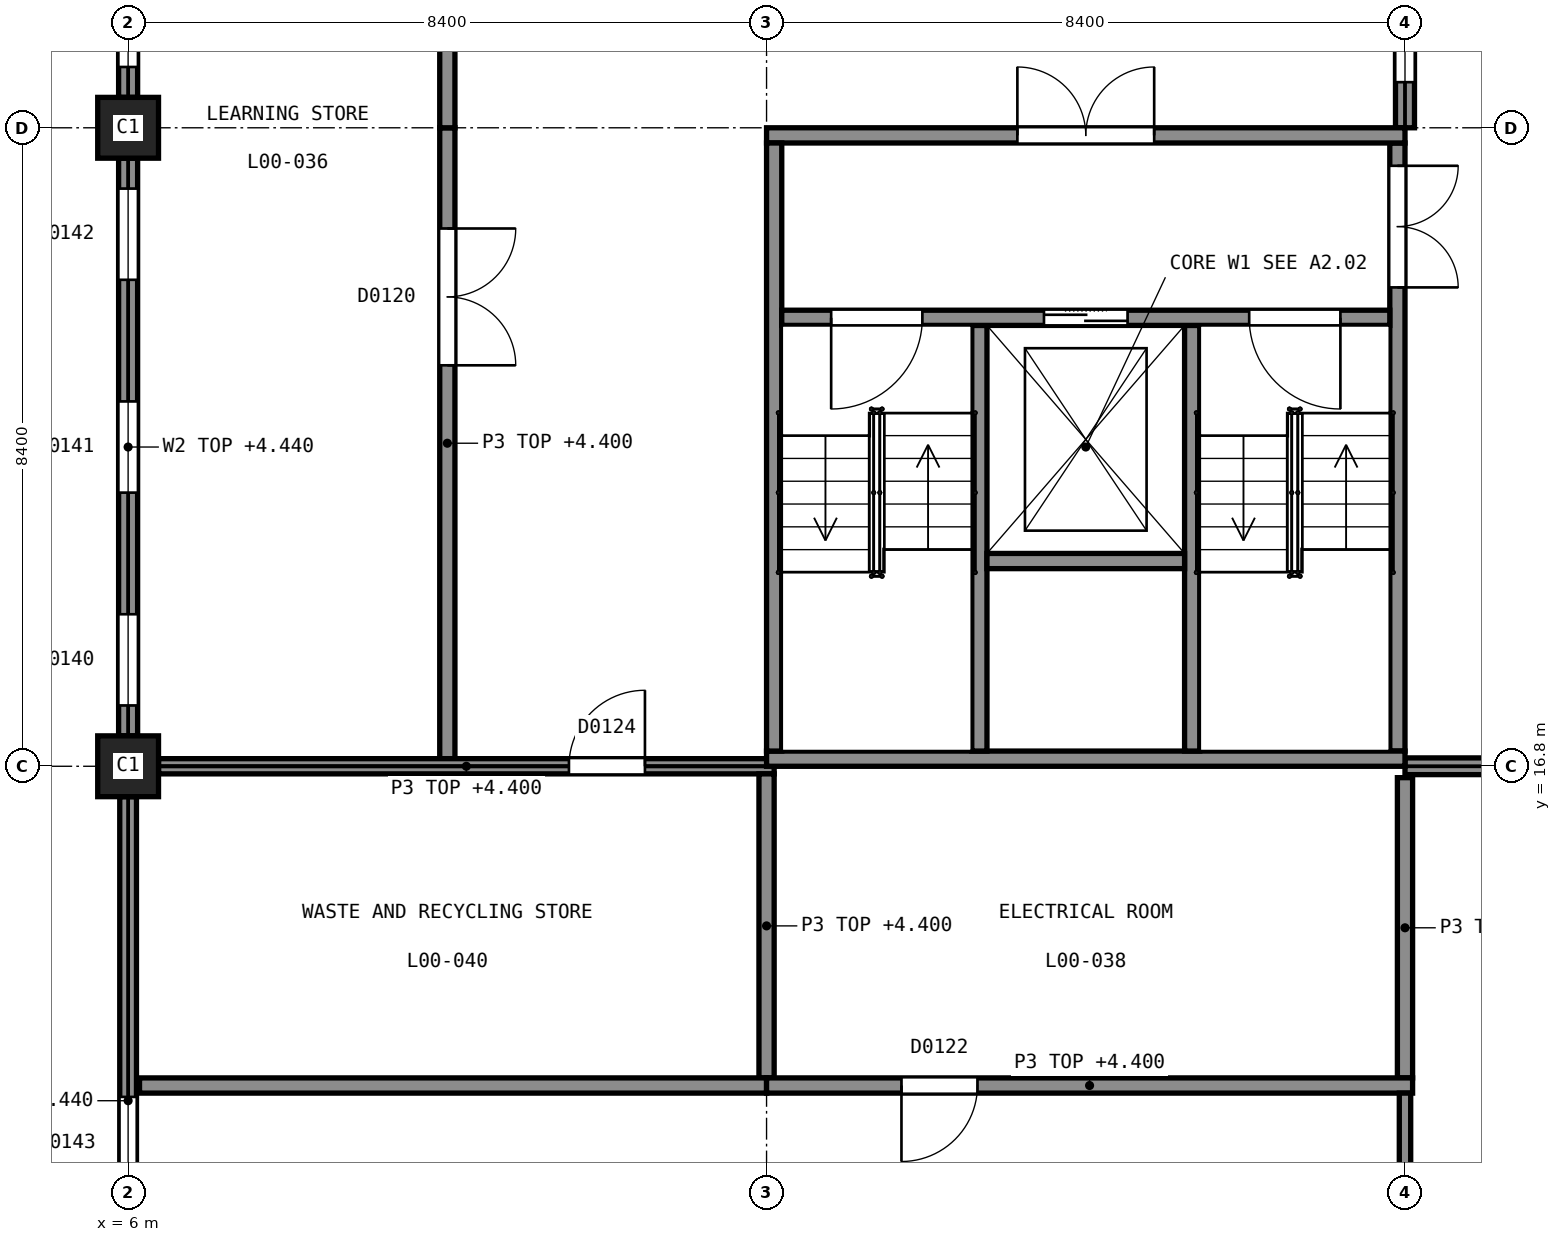
"""IFC4 building model, lengths in metres.
Left out: names, types, materials, properties, quantities, classifications, styles, units other than length and angle.
Written with IfcOpenShell. Run it as: python <this file> out.ifc"""

import sys

from ifc_helpers import new_model, si_unit, direction, frame, frame_2d, origin, origin_2d, place, context, subcontext, project, spatial, rectangle, extrude, element, fill, save


model = new_model("IFC4")
c1 = context("Model", 3, precision=1e-05, world=origin(), true_north=direction((0.0, 1.0)))
c2 = subcontext(c1, "Body", "Model", "MODEL_VIEW")
j1 = project(units=[si_unit("LENGTHUNIT", "METRE"), si_unit("PLANEANGLEUNIT", "RADIAN")], contexts=[c1])
p1 = place(None, origin())
s1 = spatial("IfcSite", under=j1, at=p1, CompositionType="ELEMENT")
p2 = place(p1, origin())
s2 = spatial("IfcBuilding", under=s1, at=p2, CompositionType="ELEMENT")
p3 = place(p2, origin())
s3 = spatial("IfcBuildingStorey", under=s2, at=p3, CompositionType="ELEMENT", Elevation=0.0)
p4 = place(p3, frame((14.4, 16.9, -1.8), z_axis=(0.0, 0.0, 1.0), x_axis=(1.0, 0.0, 0.0)))
e1 = element("IfcWall", 1, at=p4, inside=s3, PredefinedType="SHEAR", context=c2, shape_type="SweptSolid", body=[
    extrude(rectangle(XDim=8.4, YDim=0.2, at=frame_2d((4.2, 0.0))), origin(), (0.0, 0.0, 1.0), 7.3),
])
p5 = place(p3, frame((14.4, 25.1, -1.8), z_axis=(0.0, 0.0, 1.0), x_axis=(1.0, 0.0, 0.0)))
e2 = element("IfcWall", 2, at=p5, inside=s3, PredefinedType="SHEAR", context=c2, shape_type="SweptSolid", body=[
    extrude(rectangle(XDim=8.4, YDim=0.2, at=frame_2d((4.2, 0.0))), origin(), (0.0, 0.0, 1.0), 7.3),
])
p6 = place(p5, frame((3.3, 0.0, 1.8)))
e3 = element("IfcOpeningElement", 3, at=p6, cuts=e2, PredefinedType="OPENING", context=c2, shape_type="SweptSolid", body=[
    extrude(rectangle(XDim=1.8, YDim=2.1, at=frame_2d((0.9, 1.05))), frame((0.0, 0.11, 0.0), z_axis=(0.0, -1.0, 0.0), x_axis=(1.0, 0.0, 0.0)), (0.0, 0.0, 1.0), 0.22),
])
p7 = place(p3, frame((14.5, 17.0, -1.8), z_axis=(0.0, 0.0, 1.0), x_axis=(0.0, 1.0, 0.0)))
e4 = element("IfcWall", 4, at=p7, inside=s3, PredefinedType="SHEAR", context=c2, shape_type="SweptSolid", body=[
    extrude(rectangle(XDim=8.0, YDim=0.2, at=frame_2d((4.0, 0.0))), origin(), (0.0, 0.0, 1.0), 7.3),
])
p8 = place(p3, frame((22.7, 25.0, -1.8), z_axis=(0.0, 0.0, 1.0), x_axis=(0.0, -1.0, 0.0)))
e5 = element("IfcWall", 5, at=p8, inside=s3, PredefinedType="SHEAR", context=c2, shape_type="SweptSolid", body=[
    extrude(rectangle(XDim=8.0, YDim=0.2, at=frame_2d((4.0, 0.0))), origin(), (0.0, 0.0, 1.0), 7.3),
])
p9 = place(p8, frame((0.3, 0.0, 1.8)))
e6 = element("IfcOpeningElement", 6, at=p9, cuts=e5, PredefinedType="OPENING", context=c2, shape_type="SweptSolid", body=[
    extrude(rectangle(XDim=1.6, YDim=2.1, at=frame_2d((0.8, 1.05))), frame((0.0, 0.11, 0.0), z_axis=(0.0, -1.0, 0.0), x_axis=(1.0, 0.0, 0.0)), (0.0, 0.0, 1.0), 0.22),
])
p10 = place(p3, frame((14.6, 22.7, -1.8), z_axis=(0.0, 0.0, 1.0), x_axis=(1.0, 0.0, 0.0)))
e7 = element("IfcWall", 7, at=p10, inside=s3, PredefinedType="SHEAR", context=c2, shape_type="SweptSolid", body=[
    extrude(rectangle(XDim=8.0, YDim=0.2, at=frame_2d((4.0, 0.0))), origin(), (0.0, 0.0, 1.0), 7.3),
])
p11 = place(p10, frame((0.65, 0.0, 1.8)))
e8 = element("IfcOpeningElement", 8, at=p11, cuts=e7, PredefinedType="OPENING", context=c2, shape_type="SweptSolid", body=[
    extrude(rectangle(XDim=1.2, YDim=2.1, at=frame_2d((0.6, 1.05))), frame((0.0, 0.11, 0.0), z_axis=(0.0, -1.0, 0.0), x_axis=(1.0, 0.0, 0.0)), (0.0, 0.0, 1.0), 0.22),
])
p12 = place(p10, frame((6.15, 0.0, 1.8)))
e9 = element("IfcOpeningElement", 9, at=p12, cuts=e7, PredefinedType="OPENING", context=c2, shape_type="SweptSolid", body=[
    extrude(rectangle(XDim=1.2, YDim=2.1, at=frame_2d((0.6, 1.05))), frame((0.0, 0.11, 0.0), z_axis=(0.0, -1.0, 0.0), x_axis=(1.0, 0.0, 0.0)), (0.0, 0.0, 1.0), 0.22),
])
p13 = place(p10, frame((3.45, 0.0, 1.8)))
e10 = element("IfcOpeningElement", 10, at=p13, cuts=e7, PredefinedType="OPENING", context=c2, shape_type="SweptSolid", body=[
    extrude(rectangle(XDim=1.1, YDim=2.1, at=frame_2d((0.55, 1.05))), frame((0.0, 0.11, 0.0), z_axis=(0.0, -1.0, 0.0), x_axis=(1.0, 0.0, 0.0)), (0.0, 0.0, 1.0), 0.22),
])
for number, where, z_axis, x_axis in (
    (11, (17.2, 17.0, -1.8), (0.0, 0.0, 1.0), (0.0, 1.0, 0.0)),
    (12, (20.0, 17.0, -1.8), (0.0, 0.0, 1.0), (0.0, 1.0, 0.0)),
):
    element("IfcWall", number, at=place(p3, frame(where, z_axis=z_axis, x_axis=x_axis)), inside=s3, PredefinedType="SHEAR", context=c2, shape_type="SweptSolid", body=[
        extrude(rectangle(XDim=5.6, YDim=0.2, at=frame_2d((2.8, 0.0))), origin(), (0.0, 0.0, 1.0), 7.3),
    ])
p14 = place(p3, frame((17.3, 19.5, -1.8), z_axis=(0.0, 0.0, 1.0), x_axis=(1.0, 0.0, 0.0)))
e13 = element("IfcWall", 13, at=p14, inside=s3, PredefinedType="SHEAR", context=c2, shape_type="SweptSolid", body=[
    extrude(rectangle(XDim=2.6, YDim=0.2, at=frame_2d((1.3, 0.0))), origin(), (0.0, 0.0, 1.0), 7.3),
])
for number, where, z_axis, x_axis in (
    (14, (6.0, 16.8, -0.3), (0.0, 0.0, 1.0), (1.0, 0.0, 0.0)),
    (15, (6.0, 25.2, -0.3), (0.0, 0.0, 1.0), (1.0, 0.0, 0.0)),
):
    element("IfcColumn", number, at=place(p3, frame(where, z_axis=z_axis, x_axis=x_axis)), inside=s3, PredefinedType="COLUMN", context=c2, shape_type="SweptSolid", body=[
        extrude(rectangle(XDim=0.8, YDim=0.8, at=origin_2d()), origin(), (0.0, 0.0, 1.0), 5.8),
    ])
p15 = place(p3, frame((22.8, 16.8, 0.0), z_axis=(0.0, 0.0, 1.0), x_axis=(1.0, 0.0, 0.0)))
e16 = element("IfcWall", 16, at=p15, inside=s3, PredefinedType="SOLIDWALL", context=c2, shape_type="SweptSolid", body=[
    extrude(rectangle(XDim=8.0, YDim=0.22, at=frame_2d((4.0, 0.0))), origin(), (0.0, 0.0, 1.0), 4.44),
])
p16 = place(p15, frame((3.4, 0.0, 2.1)))
e17 = element("IfcOpeningElement", 17, at=p16, cuts=e16, PredefinedType="OPENING", context=c2, shape_type="SweptSolid", body=[
    extrude(rectangle(XDim=1.2, YDim=0.6, at=frame_2d((0.6, 0.3))), frame((0.0, 0.12, 0.0), z_axis=(0.0, -1.0, 0.0), x_axis=(1.0, 0.0, 0.0)), (0.0, 0.0, 1.0), 0.24),
])
p17 = place(p3, frame((22.8, 25.2, 0.0), z_axis=(0.0, 0.0, 1.0), x_axis=(0.0, 1.0, 0.0)))
e18 = element("IfcWall", 18, at=p17, inside=s3, PredefinedType="SOLIDWALL", context=c2, shape_type="SweptSolid", body=[
    extrude(rectangle(XDim=8.0, YDim=0.25, at=frame_2d((4.0, 0.0))), origin(), (0.0, 0.0, 1.0), 4.44),
])
p18 = place(p17, frame((0.6, 0.0, 0.9)))
e19 = element("IfcOpeningElement", 19, at=p18, cuts=e18, PredefinedType="OPENING", context=c2, shape_type="SweptSolid", body=[
    extrude(rectangle(XDim=1.2, YDim=2.1, at=frame_2d((0.6, 1.05))), frame((0.0, 0.135, 0.0), z_axis=(0.0, -1.0, 0.0), x_axis=(1.0, 0.0, 0.0)), (0.0, 0.0, 1.0), 0.27),
])
p19 = place(p17, frame((2.85, 0.0, 0.9)))
e20 = element("IfcOpeningElement", 20, at=p19, cuts=e18, PredefinedType="OPENING", context=c2, shape_type="SweptSolid", body=[
    extrude(rectangle(XDim=1.2, YDim=2.1, at=frame_2d((0.6, 1.05))), frame((0.0, 0.135, 0.0), z_axis=(0.0, -1.0, 0.0), x_axis=(1.0, 0.0, 0.0)), (0.0, 0.0, 1.0), 0.27),
])
p20 = place(p17, frame((6.2, 0.0, 0.9)))
e21 = element("IfcOpeningElement", 21, at=p20, cuts=e18, PredefinedType="OPENING", context=c2, shape_type="SweptSolid", body=[
    extrude(rectangle(XDim=1.2, YDim=2.1, at=frame_2d((0.6, 1.05))), frame((0.0, 0.135, 0.0), z_axis=(0.0, -1.0, 0.0), x_axis=(1.0, 0.0, 0.0)), (0.0, 0.0, 1.0), 0.27),
])
p21 = place(p3, frame((6.0, 25.6, 0.0), z_axis=(0.0, 0.0, 1.0), x_axis=(0.0, 1.0, 0.0)))
e22 = element("IfcWall", 22, at=p21, inside=s3, PredefinedType="SOLIDWALL", context=c2, shape_type="SweptSolid", body=[
    extrude(rectangle(XDim=7.6, YDim=0.25, at=frame_2d((3.8, 0.0))), origin(), (0.0, 0.0, 1.0), 4.44),
])
p22 = place(p21, frame((0.4, 0.0, 0.9)))
e23 = element("IfcOpeningElement", 23, at=p22, cuts=e22, PredefinedType="OPENING", context=c2, shape_type="SweptSolid", body=[
    extrude(rectangle(XDim=1.2, YDim=2.1, at=frame_2d((0.6, 1.05))), frame((0.0, 0.135, 0.0), z_axis=(0.0, -1.0, 0.0), x_axis=(1.0, 0.0, 0.0)), (0.0, 0.0, 1.0), 0.27),
])
p23 = place(p21, frame((3.2, 0.0, 0.9)))
e24 = element("IfcOpeningElement", 24, at=p23, cuts=e22, PredefinedType="OPENING", context=c2, shape_type="SweptSolid", body=[
    extrude(rectangle(XDim=1.2, YDim=2.1, at=frame_2d((0.6, 1.05))), frame((0.0, 0.135, 0.0), z_axis=(0.0, -1.0, 0.0), x_axis=(1.0, 0.0, 0.0)), (0.0, 0.0, 1.0), 0.27),
])
p24 = place(p21, frame((6.0, 0.0, 0.9)))
e25 = element("IfcOpeningElement", 25, at=p24, cuts=e22, PredefinedType="OPENING", context=c2, shape_type="SweptSolid", body=[
    extrude(rectangle(XDim=1.2, YDim=2.1, at=frame_2d((0.6, 1.05))), frame((0.0, 0.135, 0.0), z_axis=(0.0, -1.0, 0.0), x_axis=(1.0, 0.0, 0.0)), (0.0, 0.0, 1.0), 0.27),
])
p25 = place(p3, frame((6.0, 17.2, 0.0), z_axis=(0.0, 0.0, 1.0), x_axis=(0.0, 1.0, 0.0)))
e26 = element("IfcWall", 26, at=p25, inside=s3, PredefinedType="SOLIDWALL", context=c2, shape_type="SweptSolid", body=[
    extrude(rectangle(XDim=7.6, YDim=0.25, at=frame_2d((3.8, 0.0))), origin(), (0.0, 0.0, 1.0), 4.44),
])
p26 = place(p25, frame((0.4, 0.0, 0.9)))
e27 = element("IfcOpeningElement", 27, at=p26, cuts=e26, PredefinedType="OPENING", context=c2, shape_type="SweptSolid", body=[
    extrude(rectangle(XDim=1.2, YDim=2.1, at=frame_2d((0.6, 1.05))), frame((0.0, 0.135, 0.0), z_axis=(0.0, -1.0, 0.0), x_axis=(1.0, 0.0, 0.0)), (0.0, 0.0, 1.0), 0.27),
])
p27 = place(p25, frame((3.2, 0.0, 0.9)))
e28 = element("IfcOpeningElement", 28, at=p27, cuts=e26, PredefinedType="OPENING", context=c2, shape_type="SweptSolid", body=[
    extrude(rectangle(XDim=1.2, YDim=2.1, at=frame_2d((0.6, 1.05))), frame((0.0, 0.135, 0.0), z_axis=(0.0, -1.0, 0.0), x_axis=(1.0, 0.0, 0.0)), (0.0, 0.0, 1.0), 0.27),
])
p28 = place(p25, frame((6.0, 0.0, 0.9)))
e29 = element("IfcOpeningElement", 29, at=p28, cuts=e26, PredefinedType="OPENING", context=c2, shape_type="SweptSolid", body=[
    extrude(rectangle(XDim=1.2, YDim=2.1, at=frame_2d((0.6, 1.05))), frame((0.0, 0.135, 0.0), z_axis=(0.0, -1.0, 0.0), x_axis=(1.0, 0.0, 0.0)), (0.0, 0.0, 1.0), 0.27),
])
p29 = place(p3, frame((6.0, 8.4, 0.0), z_axis=(0.0, 0.0, 1.0), x_axis=(0.0, 1.0, 0.0)))
e30 = element("IfcWall", 30, at=p29, inside=s3, PredefinedType="SOLIDWALL", context=c2, shape_type="SweptSolid", body=[
    extrude(rectangle(XDim=8.0, YDim=0.22, at=frame_2d((4.0, 0.0))), origin(), (0.0, 0.0, 1.0), 4.44),
])
p30 = place(p29, frame((2.85, 0.0, 2.1)))
e31 = element("IfcOpeningElement", 31, at=p30, cuts=e30, PredefinedType="OPENING", context=c2, shape_type="SweptSolid", body=[
    extrude(rectangle(XDim=1.2, YDim=0.6, at=frame_2d((0.6, 0.3))), frame((0.0, 0.12, 0.0), z_axis=(0.0, -1.0, 0.0), x_axis=(1.0, 0.0, 0.0)), (0.0, 0.0, 1.0), 0.24),
])
p31 = place(p3, frame((10.2, 16.9, 0.0), z_axis=(0.0, 0.0, 1.0), x_axis=(0.0, 1.0, 0.0)))
e32 = element("IfcWall", 32, at=p31, inside=s3, PredefinedType="PARTITIONING", context=c2, shape_type="SweptSolid", body=[
    extrude(rectangle(XDim=8.3, YDim=0.2, at=frame_2d((4.15, 0.0))), origin(), (0.0, 0.0, 1.0), 4.4),
])
p32 = place(p31, frame((5.175, 0.0, 0.0)))
e33 = element("IfcOpeningElement", 33, at=p32, cuts=e32, PredefinedType="OPENING", context=c2, shape_type="SweptSolid", body=[
    extrude(rectangle(XDim=1.8, YDim=2.1, at=frame_2d((0.9, 1.05))), frame((0.0, 0.11, 0.0), z_axis=(0.0, -1.0, 0.0), x_axis=(1.0, 0.0, 0.0)), (0.0, 0.0, 1.0), 0.22),
])
p33 = place(p3, frame((10.2, 25.2, 0.0), z_axis=(0.0, 0.0, 1.0), x_axis=(0.0, 1.0, 0.0)))
e34 = element("IfcWall", 34, at=p33, inside=s3, PredefinedType="PARTITIONING", context=c2, shape_type="SweptSolid", body=[
    extrude(rectangle(XDim=8.3, YDim=0.2, at=frame_2d((4.15, 0.0))), origin(), (0.0, 0.0, 1.0), 4.4),
])
p34 = place(p3, frame((6.4, 16.8, 0.0), z_axis=(0.0, 0.0, 1.0), x_axis=(1.0, 0.0, 0.0)))
e35 = element("IfcWall", 35, at=p34, inside=s3, PredefinedType="PARTITIONING", context=c2, shape_type="SweptSolid", body=[
    extrude(rectangle(XDim=8.1, YDim=0.2, at=frame_2d((4.05, 0.0))), origin(), (0.0, 0.0, 1.0), 4.4),
])
p35 = place(p34, frame((5.4, 0.0, 0.0)))
e36 = element("IfcOpeningElement", 36, at=p35, cuts=e35, PredefinedType="OPENING", context=c2, shape_type="SweptSolid", body=[
    extrude(rectangle(XDim=1.0, YDim=2.1, at=frame_2d((0.5, 1.05))), frame((0.0, 0.11, 0.0), z_axis=(0.0, -1.0, 0.0), x_axis=(1.0, 0.0, 0.0)), (0.0, 0.0, 1.0), 0.22),
])
p36 = place(p3, frame((14.4, 12.7, 0.0), z_axis=(0.0, 0.0, 1.0), x_axis=(0.0, 1.0, 0.0)))
e37 = element("IfcWall", 37, at=p36, inside=s3, PredefinedType="PARTITIONING", context=c2, shape_type="SweptSolid", body=[
    extrude(rectangle(XDim=4.0, YDim=0.2, at=frame_2d((2.0, 0.0))), origin(), (0.0, 0.0, 1.0), 4.4),
])
p37 = place(p3, frame((22.8, 12.7, 0.0), z_axis=(0.0, 0.0, 1.0), x_axis=(0.0, 1.0, 0.0)))
e38 = element("IfcWall", 38, at=p37, inside=s3, PredefinedType="PARTITIONING", context=c2, shape_type="SweptSolid", body=[
    extrude(rectangle(XDim=3.95, YDim=0.2, at=frame_2d((1.975, 0.0))), origin(), (0.0, 0.0, 1.0), 4.4),
])
p38 = place(p3, frame((6.15, 12.6, 0.0), z_axis=(0.0, 0.0, 1.0), x_axis=(1.0, 0.0, 0.0)))
e39 = element("IfcWall", 39, at=p38, inside=s3, PredefinedType="PARTITIONING", context=c2, shape_type="SweptSolid", body=[
    extrude(rectangle(XDim=8.25, YDim=0.2, at=frame_2d((4.125, 0.0))), origin(), (0.0, 0.0, 1.0), 4.4),
])
p39 = place(p3, frame((14.4, 12.6, 0.0), z_axis=(0.0, 0.0, 1.0), x_axis=(1.0, 0.0, 0.0)))
e40 = element("IfcWall", 40, at=p39, inside=s3, PredefinedType="PARTITIONING", context=c2, shape_type="SweptSolid", body=[
    extrude(rectangle(XDim=8.5, YDim=0.2, at=frame_2d((4.25, 0.0))), origin(), (0.0, 0.0, 1.0), 4.4),
])
p40 = place(p39, frame((1.775, 0.0, 0.0)))
e41 = element("IfcOpeningElement", 41, at=p40, cuts=e40, PredefinedType="OPENING", context=c2, shape_type="SweptSolid", body=[
    extrude(rectangle(XDim=1.0, YDim=2.1, at=frame_2d((0.5, 1.05))), frame((0.0, 0.11, 0.0), z_axis=(0.0, -1.0, 0.0), x_axis=(1.0, 0.0, 0.0)), (0.0, 0.0, 1.0), 0.22),
])
p41 = place(p3, frame((22.8, 8.8, 0.0), z_axis=(0.0, 0.0, 1.0), x_axis=(0.0, 1.0, 0.0)))
e42 = element("IfcWall", 42, at=p41, inside=s3, PredefinedType="PARTITIONING", context=c2, shape_type="SweptSolid", body=[
    extrude(rectangle(XDim=3.7, YDim=0.15, at=frame_2d((1.85, 0.0))), origin(), (0.0, 0.0, 1.0), 4.4),
])
p42 = place(p18, origin())
e43 = element("IfcWindow", 43, at=p42, inside=s3, PartitioningType="SINGLE_PANEL", PredefinedType="WINDOW", context=c2, shape_type="SweptSolid", body=[
    extrude(rectangle(XDim=1.2, YDim=2.1, at=frame_2d((0.6, 1.05))), frame((0.0, 0.105, 0.0), z_axis=(0.0, -1.0, 0.0), x_axis=(1.0, 0.0, 0.0)), (0.0, 0.0, 1.0), 0.06),
])
fill(e19, e43)
p43 = place(p22, origin())
e44 = element("IfcWindow", 44, at=p43, inside=s3, PartitioningType="SINGLE_PANEL", PredefinedType="WINDOW", context=c2, shape_type="SweptSolid", body=[
    extrude(rectangle(XDim=1.2, YDim=2.1, at=frame_2d((0.6, 1.05))), frame((0.0, -0.045, 0.0), z_axis=(0.0, -1.0, 0.0), x_axis=(1.0, 0.0, 0.0)), (0.0, 0.0, 1.0), 0.06),
])
fill(e23, e44)
p44 = place(p26, origin())
e45 = element("IfcWindow", 45, at=p44, inside=s3, PartitioningType="SINGLE_PANEL", PredefinedType="WINDOW", context=c2, shape_type="SweptSolid", body=[
    extrude(rectangle(XDim=1.2, YDim=2.1, at=frame_2d((0.6, 1.05))), frame((0.0, -0.045, 0.0), z_axis=(0.0, -1.0, 0.0), x_axis=(1.0, 0.0, 0.0)), (0.0, 0.0, 1.0), 0.06),
])
fill(e27, e45)
p45 = place(p27, origin())
e46 = element("IfcWindow", 46, at=p45, inside=s3, PartitioningType="SINGLE_PANEL", PredefinedType="WINDOW", context=c2, shape_type="SweptSolid", body=[
    extrude(rectangle(XDim=1.2, YDim=2.1, at=frame_2d((0.6, 1.05))), frame((0.0, -0.045, 0.0), z_axis=(0.0, -1.0, 0.0), x_axis=(1.0, 0.0, 0.0)), (0.0, 0.0, 1.0), 0.06),
])
fill(e28, e46)
p46 = place(p28, origin())
e47 = element("IfcWindow", 47, at=p46, inside=s3, PartitioningType="SINGLE_PANEL", PredefinedType="WINDOW", context=c2, shape_type="SweptSolid", body=[
    extrude(rectangle(XDim=1.2, YDim=2.1, at=frame_2d((0.6, 1.05))), frame((0.0, -0.045, 0.0), z_axis=(0.0, -1.0, 0.0), x_axis=(1.0, 0.0, 0.0)), (0.0, 0.0, 1.0), 0.06),
])
fill(e29, e47)
p47 = place(p30, origin())
e48 = element("IfcWindow", 48, at=p47, inside=s3, PartitioningType="SINGLE_PANEL", PredefinedType="WINDOW", context=c2, shape_type="SweptSolid", body=[
    extrude(rectangle(XDim=1.2, YDim=0.6, at=frame_2d((0.6, 0.3))), frame((0.0, -0.03, 0.0), z_axis=(0.0, -1.0, 0.0), x_axis=(1.0, 0.0, 0.0)), (0.0, 0.0, 1.0), 0.06),
])
fill(e31, e48)
p48 = place(p9, origin())
e49 = element("IfcDoor", 49, at=p48, inside=s3, OperationType="DOUBLE_DOOR_SINGLE_SWING", PredefinedType="DOOR", context=c2, shape_type="SweptSolid", body=[
    extrude(rectangle(XDim=1.6, YDim=2.1, at=frame_2d((0.8, 1.05))), frame((0.0, 0.025, 0.0), z_axis=(0.0, -1.0, 0.0), x_axis=(1.0, 0.0, 0.0)), (0.0, 0.0, 1.0), 0.05),
])
fill(e6, e49)
p49 = place(p32, origin())
e50 = element("IfcDoor", 50, at=p49, inside=s3, OperationType="DOUBLE_DOOR_SINGLE_SWING", PredefinedType="DOOR", context=c2, shape_type="SweptSolid", body=[
    extrude(rectangle(XDim=1.8, YDim=2.1, at=frame_2d((0.9, 1.05))), frame((0.0, 0.025, 0.0), z_axis=(0.0, -1.0, 0.0), x_axis=(1.0, 0.0, 0.0)), (0.0, 0.0, 1.0), 0.05),
])
fill(e33, e50)
p50 = place(p40, origin())
e51 = element("IfcDoor", 51, at=p50, inside=s3, OperationType="SINGLE_SWING_LEFT", PredefinedType="DOOR", context=c2, shape_type="SweptSolid", body=[
    extrude(rectangle(XDim=1.0, YDim=2.1, at=frame_2d((0.5, 1.05))), frame((0.0, 0.025, 0.0), z_axis=(0.0, -1.0, 0.0), x_axis=(1.0, 0.0, 0.0)), (0.0, 0.0, 1.0), 0.05),
])
fill(e41, e51)
p51 = place(p35, origin())
e52 = element("IfcDoor", 52, at=p51, inside=s3, OperationType="SINGLE_SWING_LEFT", PredefinedType="DOOR", context=c2, shape_type="SweptSolid", body=[
    extrude(rectangle(XDim=1.0, YDim=2.1, at=frame_2d((0.5, 1.05))), frame((0.0, 0.025, 0.0), z_axis=(0.0, -1.0, 0.0), x_axis=(1.0, 0.0, 0.0)), (0.0, 0.0, 1.0), 0.05),
])
fill(e36, e52)
p52 = place(p6, origin())
e53 = element("IfcDoor", 53, at=p52, inside=s3, OperationType="DOUBLE_DOOR_SINGLE_SWING", PredefinedType="DOOR", context=c2, shape_type="SweptSolid", body=[
    extrude(rectangle(XDim=1.8, YDim=2.1, at=frame_2d((0.9, 1.05))), frame((0.0, 0.025, 0.0), z_axis=(0.0, -1.0, 0.0), x_axis=(1.0, 0.0, 0.0)), (0.0, 0.0, 1.0), 0.05),
])
fill(e3, e53)
p53 = place(p11, origin())
e54 = element("IfcDoor", 54, at=p53, inside=s3, OperationType="SINGLE_SWING_LEFT", PredefinedType="DOOR", context=c2, shape_type="SweptSolid", body=[
    extrude(rectangle(XDim=1.2, YDim=2.1, at=frame_2d((0.6, 1.05))), frame((0.0, 0.025, 0.0), z_axis=(0.0, -1.0, 0.0), x_axis=(1.0, 0.0, 0.0)), (0.0, 0.0, 1.0), 0.05),
])
fill(e8, e54)
p54 = place(p12, origin())
e55 = element("IfcDoor", 55, at=p54, inside=s3, OperationType="SINGLE_SWING_RIGHT", PredefinedType="DOOR", context=c2, shape_type="SweptSolid", body=[
    extrude(rectangle(XDim=1.2, YDim=2.1, at=frame_2d((0.6, 1.05))), frame((0.0, 0.025, 0.0), z_axis=(0.0, -1.0, 0.0), x_axis=(1.0, 0.0, 0.0)), (0.0, 0.0, 1.0), 0.05),
])
fill(e9, e55)
p55 = place(p13, origin())
e56 = element("IfcDoor", 56, at=p55, inside=s3, OperationType="DOUBLE_DOOR_SLIDING", PredefinedType="DOOR", context=c2, shape_type="SweptSolid", body=[
    extrude(rectangle(XDim=1.1, YDim=2.1, at=frame_2d((0.55, 1.05))), frame((0.0, 0.025, 0.0), z_axis=(0.0, -1.0, 0.0), x_axis=(1.0, 0.0, 0.0)), (0.0, 0.0, 1.0), 0.05),
])
fill(e10, e56)
save(model, sys.argv[1])
